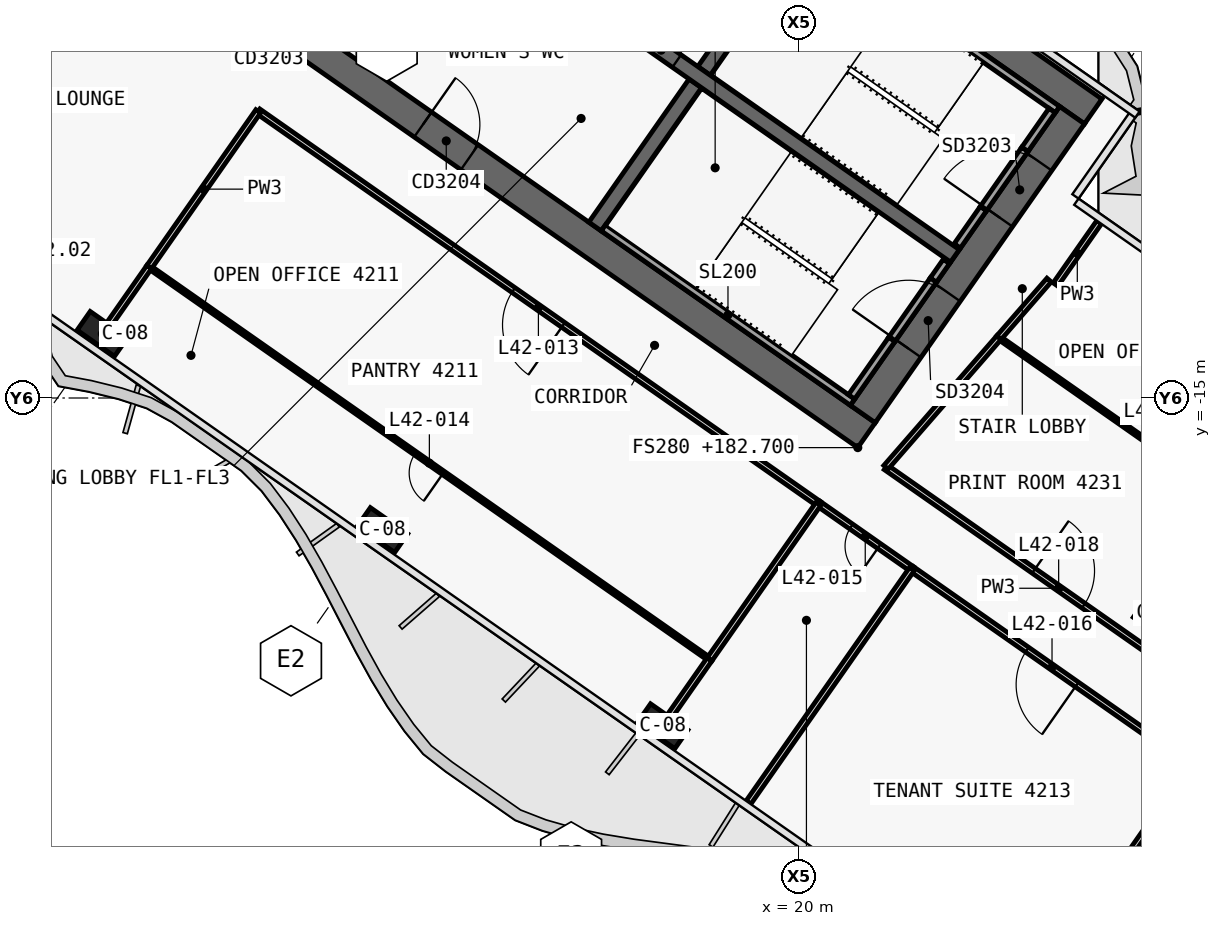
"""IFC4 building model, lengths in metres.
Left out: names, types, materials, properties, quantities, classifications, styles, units other than length and angle.
Written with IfcOpenShell. Run it as: python <this file> out.ifc"""

import sys

from ifc_helpers import new_model, si_unit, direction, frame, frame_2d, origin, origin_2d, place, context, subcontext, project, spatial, polyline, rectangle, outline, extrude, element, fill, save


model = new_model("IFC4")
c1 = context("Model", 3, precision=1e-05, world=origin(), true_north=direction((0.0, 1.0)))
c2 = subcontext(c1, "Body", "Model", "MODEL_VIEW")
j1 = project(units=[si_unit("LENGTHUNIT", "METRE"), si_unit("PLANEANGLEUNIT", "RADIAN")], contexts=[c1])
p1 = place(None, origin())
s1 = spatial("IfcSite", under=j1, at=p1, CompositionType="ELEMENT")
p2 = place(p1, origin())
s2 = spatial("IfcBuilding", under=s1, at=p2, CompositionType="ELEMENT")
p3 = place(p2, frame((0.0, 0.0, 182.7)))
s3 = spatial("IfcBuildingStorey", under=s2, at=p3, CompositionType="ELEMENT", Elevation=182.7)
p4 = place(p3, frame((-0.029, 11.984, 0.0), z_axis=(0.0, 0.0, 1.0), x_axis=(0.819151382952, -0.573577380837, 0.0)))
e1 = element("IfcWall", 1, at=p4, inside=s3, PredefinedType="SHEAR", context=c2, shape_type="SweptSolid", body=[
    extrude(outline(polyline([(33.898, 0.4), (-0.0, 0.4), (0.56, -0.4), (33.898, -0.4), (33.898, 0.4)])), origin(), (0.0, 0.0, 1.0), 3.9),
])
p5 = place(p3, frame((-0.029, -0.712, 0.0), z_axis=(0.0, 0.0, 1.0), x_axis=(0.819151758019, -0.573576845187, 0.0)))
e2 = element("IfcWall", 2, at=p5, inside=s3, PredefinedType="SHEAR", context=c2, shape_type="SweptSolid", body=[
    extrude(outline(polyline([(26.616, 0.4), (-0.0, 0.4), (0.56, -0.4), (26.616, -0.4), (26.616, 0.4)])), origin(), (0.0, 0.0, 1.0), 3.9),
])
p6 = place(p5, frame((6.666, 0.0, 0.0)))
e3 = element("IfcOpeningElement", 3, at=p6, cuts=e2, PredefinedType="OPENING", context=c2, shape_type="SweptSolid", body=[
    extrude(rectangle(XDim=1.5, YDim=2.1, at=frame_2d((0.75, 1.05))), frame((0.0, 0.41, 0.0), z_axis=(0.0, -1.0, 0.0), x_axis=(1.0, 0.0, 0.0)), (0.0, 0.0, 1.0), 0.82),
])
p7 = place(p5, frame((12.366, 0.0, 0.0)))
e4 = element("IfcOpeningElement", 4, at=p7, cuts=e2, PredefinedType="OPENING", context=c2, shape_type="SweptSolid", body=[
    extrude(rectangle(XDim=1.5, YDim=2.1, at=frame_2d((0.75, 1.05))), frame((0.0, 0.41, 0.0), z_axis=(0.0, -1.0, 0.0), x_axis=(1.0, 0.0, 0.0)), (0.0, 0.0, 1.0), 0.82),
])
p8 = place(p3, frame((21.675, -15.421, 0.0), z_axis=(0.0, 0.0, 1.0), x_axis=(0.573581815061, 0.819148278049, 0.0)))
e5 = element("IfcWall", 5, at=p8, inside=s3, PredefinedType="SHEAR", context=c2, shape_type="SweptSolid", body=[
    extrude(outline(polyline([(9.6, 0.4), (0.0, 0.4), (0.0, -0.4), (9.6, -0.4), (9.6, 0.4)])), origin(), (0.0, 0.0, 1.0), 3.9),
])
p9 = place(p8, frame((6.3, 0.0, 0.0)))
e6 = element("IfcOpeningElement", 6, at=p9, cuts=e5, PredefinedType="OPENING", context=c2, shape_type="SweptSolid", body=[
    extrude(rectangle(XDim=1.8, YDim=2.1, at=frame_2d((0.9, 1.05))), frame((0.0, 0.41, 0.0), z_axis=(0.0, -1.0, 0.0), x_axis=(1.0, 0.0, 0.0)), (0.0, 0.0, 1.0), 0.82),
])
p10 = place(p8, frame((2.1, 0.0, 0.0)))
e7 = element("IfcOpeningElement", 7, at=p10, cuts=e5, PredefinedType="OPENING", context=c2, shape_type="SweptSolid", body=[
    extrude(rectangle(XDim=1.8, YDim=2.1, at=frame_2d((0.9, 1.05))), frame((0.0, 0.41, 0.0), z_axis=(0.0, -1.0, 0.0), x_axis=(1.0, 0.0, 0.0)), (0.0, 0.0, 1.0), 0.82),
])
p11 = place(p3, frame((14.63, -10.488, 0.0), z_axis=(0.0, 0.0, 1.0), x_axis=(0.573611936273, 0.819127185829, 0.0)))
e8 = element("IfcWall", 8, at=p11, inside=s3, PredefinedType="SHEAR", context=c2, shape_type="SweptSolid", body=[
    extrude(outline(polyline([(0.0, 0.2), (0.0, -0.2), (4.6, -0.2), (4.6, 0.2), (0.0, 0.2)])), origin(), (0.0, 0.0, 1.0), 3.9),
])
p12 = place(p3, frame((17.498, -6.392, 0.0), z_axis=(0.0, 0.0, 1.0), x_axis=(0.573611936273, 0.819127185829, 0.0)))
e9 = element("IfcWall", 9, at=p12, inside=s3, PredefinedType="SHEAR", context=c2, shape_type="SweptSolid", body=[
    extrude(outline(polyline([(4.6, -0.2), (4.6, 0.2), (0.0, 0.2), (0.0, -0.2), (4.6, -0.2)])), origin(), (0.0, 0.0, 1.0), 3.9),
])
p13 = place(p3, frame((2.638, 3.768, 0.0), z_axis=(0.0, 0.0, 1.0), x_axis=(0.81915267502, -0.573575535572, 0.0)))
e10 = element("IfcWall", 10, at=p13, inside=s3, PredefinedType="SHEAR", context=c2, shape_type="SweptSolid", body=[
    extrude(outline(polyline([(0.0, 0.2), (0.0, -0.2), (26.2, -0.2), (26.2, 0.2), (0.0, 0.2)])), origin(), (0.0, 0.0, 1.0), 3.9),
])
p14 = place(p13, frame((9.637, 0.0, 0.0)))
e11 = element("IfcOpeningElement", 11, at=p14, cuts=e10, PredefinedType="OPENING", context=c2, shape_type="SweptSolid", body=[
    extrude(rectangle(XDim=1.2, YDim=2.1, at=frame_2d((0.6, 1.05))), frame((0.0, 0.21, 0.0), z_axis=(0.0, -1.0, 0.0), x_axis=(1.0, 0.0, 0.0)), (0.0, 0.0, 1.0), 0.42),
])
p15 = place(p13, frame((11.812, 0.0, 0.0)))
e12 = element("IfcOpeningElement", 12, at=p15, cuts=e10, PredefinedType="OPENING", context=c2, shape_type="SweptSolid", body=[
    extrude(rectangle(XDim=1.2, YDim=2.1, at=frame_2d((0.6, 1.05))), frame((0.0, 0.21, 0.0), z_axis=(0.0, -1.0, 0.0), x_axis=(1.0, 0.0, 0.0)), (0.0, 0.0, 1.0), 0.42),
])
p16 = place(p13, frame((13.988, 0.0, 0.0)))
e13 = element("IfcOpeningElement", 13, at=p16, cuts=e10, PredefinedType="OPENING", context=c2, shape_type="SweptSolid", body=[
    extrude(rectangle(XDim=1.2, YDim=2.1, at=frame_2d((0.6, 1.05))), frame((0.0, 0.21, 0.0), z_axis=(0.0, -1.0, 0.0), x_axis=(1.0, 0.0, 0.0)), (0.0, 0.0, 1.0), 0.42),
])
p17 = place(p13, frame((16.262, 0.0, 0.0)))
e14 = element("IfcOpeningElement", 14, at=p17, cuts=e10, PredefinedType="OPENING", context=c2, shape_type="SweptSolid", body=[
    extrude(rectangle(XDim=1.0, YDim=2.1, at=frame_2d((0.5, 1.05))), frame((0.0, 0.21, 0.0), z_axis=(0.0, -1.0, 0.0), x_axis=(1.0, 0.0, 0.0)), (0.0, 0.0, 1.0), 0.42),
])
for number, where, z_axis, x_axis in (
    (15, (1.665, -13.313, 0.0), (0.0, 0.0, 1.0), (0.819, -0.574, 0.0)),
    (16, (9.038, -18.475, 0.0), (0.0, 0.0, 1.0), (0.819, -0.574, 0.0)),
    (17, (16.41, -23.637, 0.0), (0.0, 0.0, 1.0), (0.819, -0.574, 0.0)),
):
    element("IfcColumn", number, at=place(p3, frame(where, z_axis=z_axis, x_axis=x_axis)), inside=s3, PredefinedType="COLUMN", context=c2, shape_type="SweptSolid", body=[
        extrude(rectangle(XDim=1.2, YDim=0.6, at=origin_2d()), origin(), (0.0, 0.0, 1.0), 3.9),
    ])
p18 = place(p3, frame((29.49, -20.649, 0.0), z_axis=(0.0, 0.0, 1.0), x_axis=(0.819152044289, -0.573576436351, 0.0)))
e18 = element("IfcColumn", 18, at=p18, inside=s3, PredefinedType="COLUMN", context=c2, shape_type="SweptSolid", body=[
    extrude(rectangle(XDim=1.0, YDim=1.0, at=origin_2d()), origin(), (0.0, 0.0, 1.0), 3.9),
])
p19 = place(p3, frame((20.243, -2.821, 0.0), z_axis=(0.0, 0.0, 1.0), x_axis=(0.819141584393, -0.57359137434, 0.0)))
e19 = element("IfcWall", 19, at=p19, inside=s3, PredefinedType="SOLIDWALL", context=c2, shape_type="SweptSolid", body=[
    extrude(rectangle(XDim=8.0, YDim=0.2, at=frame_2d((4.0, 0.0))), origin(), (0.0, 0.0, 1.0), 3.62),
])
p20 = place(p3, frame((24.162, -10.998, 0.0), z_axis=(0.0, 0.0, 1.0), x_axis=(0.573612502218, 0.819126789514, 0.0)))
e20 = element("IfcWall", 20, at=p20, inside=s3, PredefinedType="SOLIDWALL", context=c2, shape_type="SweptSolid", body=[
    extrude(rectangle(XDim=1.2, YDim=0.2, at=frame_2d((0.6, 0.0))), origin(), (0.0, 0.0, 1.0), 3.62),
])
p21 = place(p3, frame((25.94, -8.458, 0.0), z_axis=(0.0, 0.0, 1.0), x_axis=(0.573619628835, 0.819121798889, 0.0)))
e21 = element("IfcWall", 21, at=p21, inside=s3, PredefinedType="SOLIDWALL", context=c2, shape_type="SweptSolid", body=[
    extrude(rectangle(XDim=1.25, YDim=0.2, at=frame_2d((0.625, 0.0))), origin(), (0.0, 0.0, 1.0), 3.62),
])
p22 = place(p3, frame((24.85, -10.014, 2.15), z_axis=(0.0, 0.0, 1.0), x_axis=(0.573505465124, 0.819201734296, 0.0)))
e22 = element("IfcWall", 22, at=p22, inside=s3, PredefinedType="SOLIDWALL", context=c2, shape_type="SweptSolid", body=[
    extrude(rectangle(XDim=1.9, YDim=0.2, at=frame_2d((0.95, 0.0))), origin(), (0.0, 0.0, 1.0), 1.47),
])
p23 = place(p3, frame((14.851, -10.521, 0.0), z_axis=(0.0, 0.0, 1.0), x_axis=(0.819141584393, -0.57359137434, 0.0)))
e23 = element("IfcWall", 23, at=p23, inside=s3, PredefinedType="SOLIDWALL", context=c2, shape_type="SweptSolid", body=[
    extrude(rectangle(XDim=8.0, YDim=0.2, at=frame_2d((4.0, 0.0))), origin(), (0.0, 0.0, 1.0), 3.62),
])
p24 = place(p3, frame((21.38, -14.97, 0.0), z_axis=(0.0, 0.0, 1.0), x_axis=(0.573559770908, 0.819163713305, 0.0)))
e24 = element("IfcWall", 24, at=p24, inside=s3, PredefinedType="SOLIDWALL", context=c2, shape_type="SweptSolid", body=[
    extrude(rectangle(XDim=1.85, YDim=0.2, at=frame_2d((0.925, 0.0))), origin(), (0.0, 0.0, 1.0), 3.62),
])
p25 = place(p3, frame((23.531, -11.898, 0.0), z_axis=(0.0, 0.0, 1.0), x_axis=(0.573708088123, 0.819059844958, 0.0)))
e25 = element("IfcWall", 25, at=p25, inside=s3, PredefinedType="SOLIDWALL", context=c2, shape_type="SweptSolid", body=[
    extrude(rectangle(XDim=0.6, YDim=0.2, at=frame_2d((0.3, 0.0))), origin(), (0.0, 0.0, 1.0), 3.62),
])
p26 = place(p3, frame((22.441, -13.455, 2.15), z_axis=(0.0, 0.0, 1.0), x_axis=(0.573591692345, 0.819141361715, 0.0)))
e26 = element("IfcWall", 26, at=p26, inside=s3, PredefinedType="SOLIDWALL", context=c2, shape_type="SweptSolid", body=[
    extrude(rectangle(XDim=1.9, YDim=0.2, at=frame_2d((0.95, 0.0))), origin(), (0.0, 0.0, 1.0), 1.47),
])
p27 = place(p3, frame((22.283, -16.824, 0.0), z_axis=(0.0, 0.0, 1.0), x_axis=(0.819159575642, -0.573565680313, 0.0)))
e27 = element("IfcWall", 27, at=p27, inside=s3, PredefinedType="PARTITIONING", context=c2, shape_type="SweptSolid", body=[
    extrude(rectangle(XDim=11.099, YDim=0.15, at=frame_2d((5.549, 0.0))), origin(), (0.0, 0.0, 1.0), 3.0),
])
p28 = place(p27, frame((4.75, 0.0, 0.0)))
e28 = element("IfcOpeningElement", 28, at=p28, cuts=e27, PredefinedType="OPENING", context=c2, shape_type="SweptSolid", body=[
    extrude(rectangle(XDim=1.6, YDim=2.1, at=frame_2d((0.8, 1.05))), frame((0.0, 0.085, 0.0), z_axis=(0.0, -1.0, 0.0), x_axis=(1.0, 0.0, 0.0)), (0.0, 0.0, 1.0), 0.17),
])
p29 = place(p3, frame((20.513, -17.781, 0.0), z_axis=(0.0, 0.0, 1.0), x_axis=(-0.819147172988, 0.573583393228, 0.0)))
e29 = element("IfcWall", 29, at=p29, inside=s3, PredefinedType="PARTITIONING", context=c2, shape_type="SweptSolid", body=[
    extrude(rectangle(XDim=18.002, YDim=0.15, at=frame_2d((9.001, 0.0))), origin(), (0.0, 0.0, 1.0), 3.0),
])
p30 = place(p29, frame((8.201, 0.0, 0.0)))
e30 = element("IfcOpeningElement", 30, at=p30, cuts=e29, PredefinedType="OPENING", context=c2, shape_type="SweptSolid", body=[
    extrude(rectangle(XDim=1.6, YDim=2.1, at=frame_2d((0.8, 1.05))), frame((0.0, 0.085, 0.0), z_axis=(0.0, -1.0, 0.0), x_axis=(1.0, 0.0, 0.0)), (0.0, 0.0, 1.0), 0.17),
])
p31 = place(p3, frame((22.97, -19.502, 0.0), z_axis=(0.0, 0.0, 1.0), x_axis=(-0.819128818764, 0.573609604409, 0.0)))
e31 = element("IfcWall", 31, at=p31, inside=s3, PredefinedType="PARTITIONING", context=c2, shape_type="SweptSolid", body=[
    extrude(rectangle(XDim=3.004, YDim=0.15, at=frame_2d((1.502, 0.0))), origin(), (0.0, 0.0, 1.0), 3.0),
])
p32 = place(p31, frame((1.052, 0.0, 0.0)))
e32 = element("IfcOpeningElement", 32, at=p32, cuts=e31, PredefinedType="OPENING", context=c2, shape_type="SweptSolid", body=[
    extrude(rectangle(XDim=0.9, YDim=2.1, at=frame_2d((0.45, 1.05))), frame((0.0, 0.085, 0.0), z_axis=(0.0, -1.0, 0.0), x_axis=(1.0, 0.0, 0.0)), (0.0, 0.0, 1.0), 0.17),
])
p33 = place(p3, frame((30.343, -24.664, 0.0), z_axis=(0.0, 0.0, 1.0), x_axis=(-0.819151661297, 0.57357698332, 0.0)))
e33 = element("IfcWall", 33, at=p33, inside=s3, PredefinedType="PARTITIONING", context=c2, shape_type="SweptSolid", body=[
    extrude(rectangle(XDim=9.004, YDim=0.15, at=frame_2d((4.502, 0.0))), origin(), (0.0, 0.0, 1.0), 3.0),
])
p34 = place(p33, frame((3.702, 0.0, 0.0)))
e34 = element("IfcOpeningElement", 34, at=p34, cuts=e33, PredefinedType="OPENING", context=c2, shape_type="SweptSolid", body=[
    extrude(rectangle(XDim=1.6, YDim=2.1, at=frame_2d((0.8, 1.05))), frame((0.0, 0.085, 0.0), z_axis=(0.0, -1.0, 0.0), x_axis=(1.0, 0.0, 0.0)), (0.0, 0.0, 1.0), 0.17),
])
p35 = place(p3, frame((25.258, -13.412, 0.0), z_axis=(0.0, 0.0, 1.0), x_axis=(0.81915089424, -0.573578078788, 0.0)))
e35 = element("IfcWall", 35, at=p35, inside=s3, PredefinedType="PARTITIONING", context=c2, shape_type="SweptSolid", body=[
    extrude(rectangle(XDim=10.618, YDim=0.1, at=frame_2d((5.309, 0.0))), origin(), (0.0, 0.0, 1.0), 3.0),
])
p36 = place(p35, frame((4.859, 0.0, 0.0)))
e36 = element("IfcOpeningElement", 36, at=p36, cuts=e35, PredefinedType="OPENING", context=c2, shape_type="SweptSolid", body=[
    extrude(rectangle(XDim=0.9, YDim=2.1, at=frame_2d((0.45, 1.05))), frame((0.0, 0.06, 0.0), z_axis=(0.0, -1.0, 0.0), x_axis=(1.0, 0.0, 0.0)), (0.0, 0.0, 1.0), 0.12),
])
p37 = place(p3, frame((25.258, -13.412, 0.0), z_axis=(0.0, 0.0, 1.0), x_axis=(0.656791883473, 0.75407189432, 0.0)))
e37 = element("IfcWall", 37, at=p37, inside=s3, PredefinedType="PARTITIONING", context=c2, shape_type="SweptSolid", body=[
    extrude(rectangle(XDim=2.01, YDim=0.15, at=frame_2d((1.005, 0.0))), origin(), (0.0, 0.0, 1.0), 3.62),
])
p38 = place(p3, frame((26.746, -12.014, 0.0), z_axis=(0.0, 0.0, 1.0), x_axis=(0.573568836472, 0.819157365729, 0.0)))
e38 = element("IfcWall", 38, at=p38, inside=s3, PredefinedType="PARTITIONING", context=c2, shape_type="SweptSolid", body=[
    extrude(rectangle(XDim=2.0, YDim=0.15, at=frame_2d((1.0, 0.0))), origin(), (0.0, 0.0, 1.0), 3.0),
])
p39 = place(p3, frame((22.285, -16.825, 0.0), z_axis=(0.0, 0.0, 1.0), x_axis=(0.656764910052, 0.754095387152, 0.0)))
e39 = element("IfcWall", 39, at=p39, inside=s3, PredefinedType="PARTITIONING", context=c2, shape_type="SweptSolid", body=[
    extrude(rectangle(XDim=4.525, YDim=0.15, at=frame_2d((2.263, 0.0))), origin(), (0.0, 0.0, 1.0), 3.0),
])
p40 = place(p3, frame((17.643, -21.877, 0.0), z_axis=(0.0, 0.0, 1.0), x_axis=(-0.819154173185, 0.573573395961, 0.0)))
e40 = element("IfcWall", 40, at=p40, inside=s3, PredefinedType="PARTITIONING", context=c2, shape_type="SweptSolid", body=[
    extrude(rectangle(XDim=18.0, YDim=0.1, at=frame_2d((9.0, 0.0))), origin(), (0.0, 0.0, 1.0), 3.0),
])
p41 = place(p40, frame((8.55, 0.0, 0.0)))
e41 = element("IfcOpeningElement", 41, at=p41, cuts=e40, PredefinedType="OPENING", context=c2, shape_type="SweptSolid", body=[
    extrude(rectangle(XDim=0.9, YDim=2.1, at=frame_2d((0.45, 1.05))), frame((0.0, 0.06, 0.0), z_axis=(0.0, -1.0, 0.0), x_axis=(1.0, 0.0, 0.0)), (0.0, 0.0, 1.0), 0.12),
])
p42 = place(p3, frame((17.643, -21.877, 0.0), z_axis=(0.0, 0.0, 1.0), x_axis=(-0.573560882037, -0.819162935317, 0.0)))
e42 = element("IfcWall", 42, at=p42, inside=s3, PredefinedType="PARTITIONING", context=c2, shape_type="SweptSolid", body=[
    extrude(rectangle(XDim=1.829, YDim=0.15, at=frame_2d((0.915, 0.0))), origin(), (0.0, 0.0, 1.0), 3.0),
])
p43 = place(p3, frame((1.849, -13.051, 0.0), z_axis=(0.0, 0.0, 1.0), x_axis=(0.573623601139, 0.819119017125, 0.0)))
e43 = element("IfcWall", 43, at=p43, inside=s3, PredefinedType="PARTITIONING", context=c2, shape_type="SweptSolid", body=[
    extrude(rectangle(XDim=1.829, YDim=0.15, at=frame_2d((0.915, 0.0))), origin(), (0.0, 0.0, 1.0), 3.0),
])
p44 = place(p3, frame((20.511, -17.78, 0.0), z_axis=(0.0, 0.0, 1.0), x_axis=(-0.573554101347, -0.819167682973, 0.0)))
e44 = element("IfcWall", 44, at=p44, inside=s3, PredefinedType="PARTITIONING", context=c2, shape_type="SweptSolid", body=[
    extrude(rectangle(XDim=5.0, YDim=0.15, at=frame_2d((2.5, 0.0))), origin(), (0.0, 0.0, 1.0), 3.0),
])
p45 = place(p3, frame((2.898, -11.552, 0.0), z_axis=(0.0, 0.0, 1.0), x_axis=(0.573586866468, 0.819144740944, 0.0)))
e45 = element("IfcWall", 45, at=p45, inside=s3, PredefinedType="PARTITIONING", context=c2, shape_type="SweptSolid", body=[
    extrude(rectangle(XDim=5.0, YDim=0.15, at=frame_2d((2.5, 0.0))), origin(), (0.0, 0.0, 1.0), 3.0),
])
p46 = place(p3, frame((22.969, -19.501, 0.0), z_axis=(0.0, 0.0, 1.0), x_axis=(-0.573575945067, -0.81915238829, 0.0)))
e46 = element("IfcWall", 46, at=p46, inside=s3, PredefinedType="PARTITIONING", context=c2, shape_type="SweptSolid", body=[
    extrude(rectangle(XDim=7.5, YDim=0.15, at=frame_2d((3.75, 0.0))), origin(), (0.0, 0.0, 1.0), 2.9),
])
p47 = place(p3, frame((30.341, -24.663, 0.0), z_axis=(0.0, 0.0, 1.0), x_axis=(-0.573577493031, -0.819151304393, 0.0)))
e47 = element("IfcWall", 47, at=p47, inside=s3, PredefinedType="PARTITIONING", context=c2, shape_type="SweptSolid", body=[
    extrude(rectangle(XDim=6.83, YDim=0.15, at=frame_2d((3.415, 0.0))), origin(), (0.0, 0.0, 1.0), 2.9),
])
p48 = place(p17, origin())
e48 = element("IfcDoor", 48, at=p48, inside=s3, OperationType="SINGLE_SWING_RIGHT", PredefinedType="DOOR", context=c2, shape_type="SweptSolid", body=[
    extrude(rectangle(XDim=1.0, YDim=2.1, at=frame_2d((0.5, 1.05))), frame((0.0, 0.025, 0.0), z_axis=(0.0, -1.0, 0.0), x_axis=(1.0, 0.0, 0.0)), (0.0, 0.0, 1.0), 0.05),
])
fill(e14, e48)
p49 = place(p7, origin())
e49 = element("IfcDoor", 49, at=p49, inside=s3, OperationType="DOUBLE_DOOR_SINGLE_SWING", PredefinedType="DOOR", context=c2, shape_type="SweptSolid", body=[
    extrude(rectangle(XDim=1.5, YDim=2.1, at=frame_2d((0.75, 1.05))), frame((0.0, 0.025, 0.0), z_axis=(0.0, -1.0, 0.0), x_axis=(1.0, 0.0, 0.0)), (0.0, 0.0, 1.0), 0.05),
])
fill(e4, e49)
p50 = place(p9, origin())
e50 = element("IfcDoor", 50, at=p50, inside=s3, OperationType="DOUBLE_DOOR_SINGLE_SWING", PredefinedType="DOOR", context=c2, shape_type="SweptSolid", body=[
    extrude(rectangle(XDim=1.8, YDim=2.1, at=frame_2d((0.9, 1.05))), frame((0.0, 0.025, 0.0), z_axis=(0.0, -1.0, 0.0), x_axis=(1.0, 0.0, 0.0)), (0.0, 0.0, 1.0), 0.05),
])
fill(e6, e50)
p51 = place(p10, origin())
e51 = element("IfcDoor", 51, at=p51, inside=s3, OperationType="DOUBLE_DOOR_SINGLE_SWING", PredefinedType="DOOR", context=c2, shape_type="SweptSolid", body=[
    extrude(rectangle(XDim=1.8, YDim=2.1, at=frame_2d((0.9, 1.05))), frame((0.0, 0.025, 0.0), z_axis=(0.0, -1.0, 0.0), x_axis=(1.0, 0.0, 0.0)), (0.0, 0.0, 1.0), 0.05),
])
fill(e7, e51)
p52 = place(p30, origin())
e52 = element("IfcDoor", 52, at=p52, inside=s3, OperationType="DOUBLE_DOOR_SINGLE_SWING", PredefinedType="DOOR", context=c2, shape_type="SweptSolid", body=[
    extrude(rectangle(XDim=1.6, YDim=2.1, at=frame_2d((0.8, 1.05))), frame((0.0, 0.025, 0.0), z_axis=(0.0, -1.0, 0.0), x_axis=(1.0, 0.0, 0.0)), (0.0, 0.0, 1.0), 0.05),
])
fill(e30, e52)
p53 = place(p41, origin())
e53 = element("IfcDoor", 53, at=p53, inside=s3, OperationType="SINGLE_SWING_RIGHT", PredefinedType="DOOR", context=c2, shape_type="SweptSolid", body=[
    extrude(rectangle(XDim=0.9, YDim=2.1, at=frame_2d((0.45, 1.05))), frame((0.0, 0.025, 0.0), z_axis=(0.0, -1.0, 0.0), x_axis=(1.0, 0.0, 0.0)), (0.0, 0.0, 1.0), 0.05),
])
fill(e41, e53)
p54 = place(p32, origin())
e54 = element("IfcDoor", 54, at=p54, inside=s3, OperationType="SINGLE_SWING_RIGHT", PredefinedType="DOOR", context=c2, shape_type="SweptSolid", body=[
    extrude(rectangle(XDim=0.9, YDim=2.1, at=frame_2d((0.45, 1.05))), frame((0.0, 0.025, 0.0), z_axis=(0.0, -1.0, 0.0), x_axis=(1.0, 0.0, 0.0)), (0.0, 0.0, 1.0), 0.05),
])
fill(e32, e54)
p55 = place(p34, origin())
e55 = element("IfcDoor", 55, at=p55, inside=s3, OperationType="DOUBLE_DOOR_SINGLE_SWING", PredefinedType="DOOR", context=c2, shape_type="SweptSolid", body=[
    extrude(rectangle(XDim=1.6, YDim=2.1, at=frame_2d((0.8, 1.05))), frame((0.0, 0.025, 0.0), z_axis=(0.0, -1.0, 0.0), x_axis=(1.0, 0.0, 0.0)), (0.0, 0.0, 1.0), 0.05),
])
fill(e34, e55)
p56 = place(p28, origin())
e56 = element("IfcDoor", 56, at=p56, inside=s3, OperationType="DOUBLE_DOOR_SINGLE_SWING", PredefinedType="DOOR", context=c2, shape_type="SweptSolid", body=[
    extrude(rectangle(XDim=1.6, YDim=2.1, at=frame_2d((0.8, 1.05))), frame((0.0, 0.025, 0.0), z_axis=(0.0, -1.0, 0.0), x_axis=(1.0, 0.0, 0.0)), (0.0, 0.0, 1.0), 0.05),
])
fill(e28, e56)
save(model, sys.argv[1])
